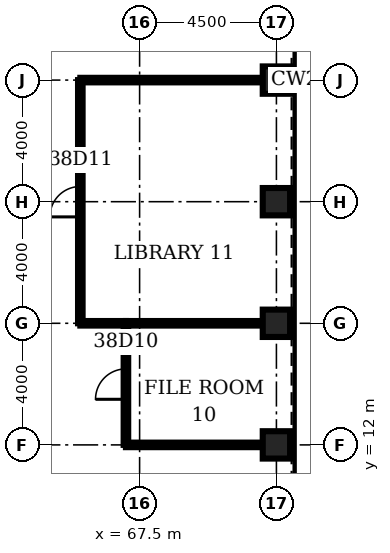
"""IFC4 building model, lengths in metres.
Left out: names, types, materials, properties, quantities, classifications, styles, units other than length and angle.
Written with IfcOpenShell. Run it as: python <this file> out.ifc"""

import sys

from ifc_helpers import new_model, si_unit, direction, frame, frame_2d, origin, origin_2d, place, context, subcontext, project, spatial, rectangle, hollow_rectangle, extrude, element, fill, save


model = new_model("IFC4")
c1 = context("Model", 3, precision=1e-05, world=origin(), true_north=direction((0.0, 1.0)))
c2 = subcontext(c1, "Body", "Model", "MODEL_VIEW")
j1 = project(units=[si_unit("LENGTHUNIT", "METRE"), si_unit("PLANEANGLEUNIT", "RADIAN")], contexts=[c1])
p1 = place(None, origin())
s1 = spatial("IfcSite", under=j1, at=p1, CompositionType="ELEMENT")
p2 = place(p1, origin())
s2 = spatial("IfcBuilding", under=s1, at=p2, CompositionType="ELEMENT")
p3 = place(p2, frame((0.0, 0.0, 171.9)))
s3 = spatial("IfcBuildingStorey", under=s2, at=p3, CompositionType="ELEMENT", Elevation=171.9)
for number, where, z_axis, x_axis in (
    (1, (72.0, 12.0, 0.0), (0.0, 0.0, 1.0), (1.0, 0.0, 0.0)),
    (2, (72.0, 16.0, 0.0), (0.0, 0.0, 1.0), (1.0, 0.0, 0.0)),
    (3, (72.0, 20.0, 0.0), (0.0, 0.0, 1.0), (1.0, 0.0, 0.0)),
    (4, (72.0, 24.0, 0.0), (0.0, 0.0, 1.0), (1.0, 0.0, 0.0)),
):
    element("IfcColumn", number, at=place(p3, frame(where, z_axis=z_axis, x_axis=x_axis)), inside=s3, PredefinedType="COLUMN", context=c2, shape_type="SweptSolid", body=[
        extrude(hollow_rectangle(XDim=0.9, YDim=0.9, WallThickness=0.09, at=origin_2d()), origin(), (0.0, 0.0, 1.0), 4.2),
    ])
p4 = place(p3, frame((67.05, 12.0, 0.0), z_axis=(0.0, 0.0, 1.0), x_axis=(1.0, 0.0, 0.0)))
e5 = element("IfcWall", 5, at=p4, inside=s3, PredefinedType="PARTITIONING", context=c2, shape_type="SweptSolid", body=[
    extrude(rectangle(XDim=4.5, YDim=0.15, at=frame_2d((2.25, 0.0))), origin(), (0.0, 0.0, 1.0), 3.0),
])
p5 = place(p3, frame((65.55, 16.0, 0.0), z_axis=(0.0, 0.0, 1.0), x_axis=(1.0, 0.0, 0.0)))
e6 = element("IfcWall", 6, at=p5, inside=s3, PredefinedType="PARTITIONING", context=c2, shape_type="SweptSolid", body=[
    extrude(rectangle(XDim=1.5, YDim=0.15, at=frame_2d((0.75, 0.0))), origin(), (0.0, 0.0, 1.0), 3.0),
])
p6 = place(p3, frame((67.05, 16.0, 0.0), z_axis=(0.0, 0.0, 1.0), x_axis=(1.0, 0.0, 0.0)))
e7 = element("IfcWall", 7, at=p6, inside=s3, PredefinedType="PARTITIONING", context=c2, shape_type="SweptSolid", body=[
    extrude(rectangle(XDim=4.5, YDim=0.15, at=frame_2d((2.25, 0.0))), origin(), (0.0, 0.0, 1.0), 3.0),
])
p7 = place(p3, frame((65.55, 24.0, 0.0), z_axis=(0.0, 0.0, 1.0), x_axis=(1.0, 0.0, 0.0)))
e8 = element("IfcWall", 8, at=p7, inside=s3, PredefinedType="PARTITIONING", context=c2, shape_type="SweptSolid", body=[
    extrude(rectangle(XDim=6.0, YDim=0.15, at=frame_2d((3.0, 0.0))), origin(), (0.0, 0.0, 1.0), 3.0),
])
p8 = place(p3, frame((65.55, 16.0, 0.0), z_axis=(0.0, 0.0, 1.0), x_axis=(0.0, 1.0, 0.0)))
e9 = element("IfcWall", 9, at=p8, inside=s3, PredefinedType="PARTITIONING", context=c2, shape_type="SweptSolid", body=[
    extrude(rectangle(XDim=8.0, YDim=0.15, at=frame_2d((4.0, 0.0))), origin(), (0.0, 0.0, 1.0), 3.0),
])
p9 = place(p8, frame((3.5, 0.0, 0.0)))
e10 = element("IfcOpeningElement", 10, at=p9, cuts=e9, PredefinedType="OPENING", context=c2, shape_type="SweptSolid", body=[
    extrude(rectangle(XDim=1.0, YDim=2.1, at=frame_2d((0.5, 1.05))), frame((0.0, 0.085, 0.0), z_axis=(0.0, -1.0, 0.0), x_axis=(1.0, 0.0, 0.0)), (0.0, 0.0, 1.0), 0.17),
])
p10 = place(p3, frame((67.05, 12.0, 0.0), z_axis=(0.0, 0.0, 1.0), x_axis=(0.0, 1.0, 0.0)))
e11 = element("IfcWall", 11, at=p10, inside=s3, PredefinedType="PARTITIONING", context=c2, shape_type="SweptSolid", body=[
    extrude(rectangle(XDim=4.0, YDim=0.15, at=frame_2d((2.0, 0.0))), origin(), (0.0, 0.0, 1.0), 3.0),
])
p11 = place(p10, frame((1.5, 0.0, 0.0)))
e12 = element("IfcOpeningElement", 12, at=p11, cuts=e11, PredefinedType="OPENING", context=c2, shape_type="SweptSolid", body=[
    extrude(rectangle(XDim=1.0, YDim=2.1, at=frame_2d((0.5, 1.05))), frame((0.0, 0.085, 0.0), z_axis=(0.0, -1.0, 0.0), x_axis=(1.0, 0.0, 0.0)), (0.0, 0.0, 1.0), 0.17),
])
p12 = place(p11, origin())
e13 = element("IfcDoor", 13, at=p12, inside=s3, OperationType="SINGLE_SWING_LEFT", PredefinedType="DOOR", context=c2, shape_type="SweptSolid", body=[
    extrude(rectangle(XDim=1.0, YDim=2.1, at=frame_2d((0.5, 1.05))), frame((0.0, 0.025, 0.0), z_axis=(0.0, -1.0, 0.0), x_axis=(1.0, 0.0, 0.0)), (0.0, 0.0, 1.0), 0.05),
])
fill(e12, e13)
p13 = place(p9, origin())
e14 = element("IfcDoor", 14, at=p13, inside=s3, OperationType="SINGLE_SWING_LEFT", PredefinedType="DOOR", context=c2, shape_type="SweptSolid", body=[
    extrude(rectangle(XDim=1.0, YDim=2.1, at=frame_2d((0.5, 1.05))), frame((0.0, 0.025, 0.0), z_axis=(0.0, -1.0, 0.0), x_axis=(1.0, 0.0, 0.0)), (0.0, 0.0, 1.0), 0.05),
])
fill(e10, e14)
save(model, sys.argv[1])
